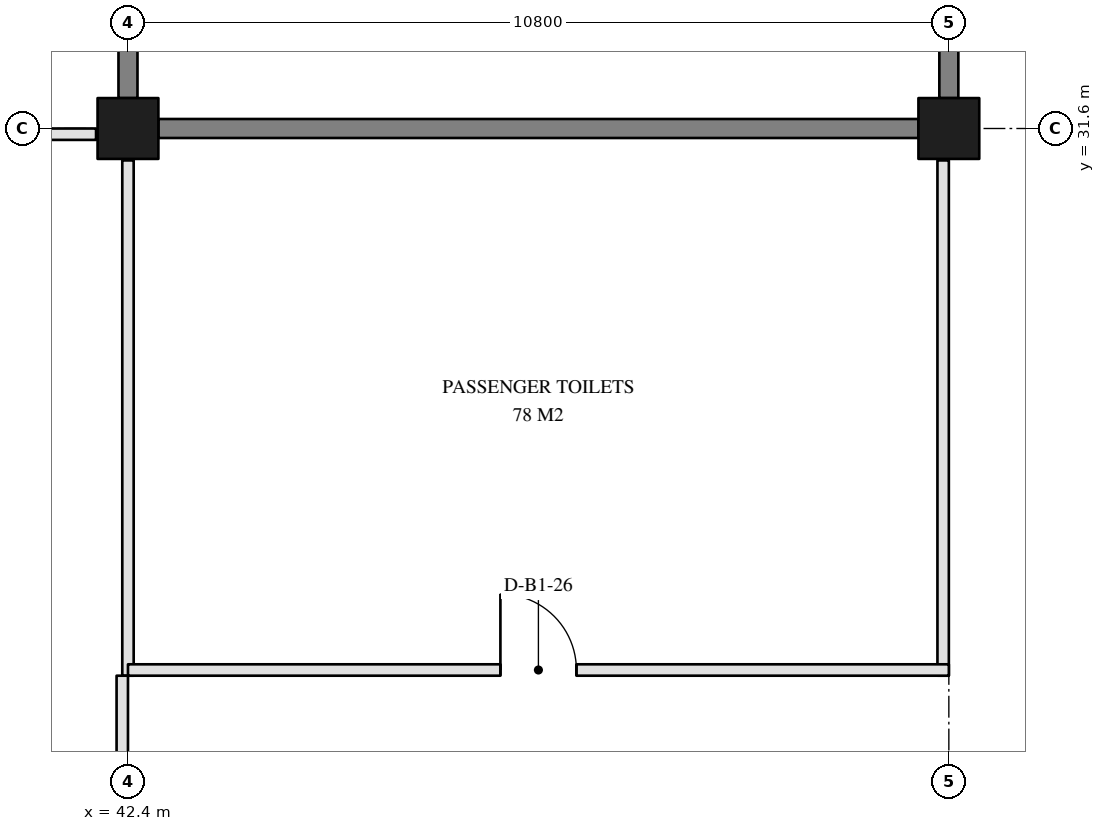
"""IFC4 building model, lengths in metres.
Left out: names, types, materials, properties, quantities, classifications, styles, units other than length and angle.
Written with IfcOpenShell. Run it as: python <this file> out.ifc"""

import sys

from ifc_helpers import new_model, si_unit, direction, frame, frame_2d, origin, origin_2d, place, context, subcontext, project, spatial, rectangle, extrude, element, fill, save


model = new_model("IFC4")
c1 = context("Model", 3, precision=1e-05, world=origin(), true_north=direction((0.0, 1.0)))
c2 = subcontext(c1, "Body", "Model", "MODEL_VIEW")
j1 = project(units=[si_unit("LENGTHUNIT", "METRE"), si_unit("PLANEANGLEUNIT", "RADIAN")], contexts=[c1])
p1 = place(None, origin())
s1 = spatial("IfcSite", under=j1, at=p1, CompositionType="ELEMENT")
p2 = place(p1, origin())
s2 = spatial("IfcBuilding", under=s1, at=p2, CompositionType="ELEMENT")
p3 = place(p2, frame((0.0, 0.0, -5.4)))
s3 = spatial("IfcBuildingStorey", under=s2, at=p3, CompositionType="ELEMENT", Elevation=-5.4)
for number, where, z_axis, x_axis in (
    (1, (42.4, 31.6, -0.4), (0.0, 0.0, 1.0), (1.0, 0.0, 0.0)),
    (2, (53.2, 31.6, -0.4), (0.0, 0.0, 1.0), (1.0, 0.0, 0.0)),
):
    element("IfcColumn", number, at=place(p3, frame(where, z_axis=z_axis, x_axis=x_axis)), inside=s3, PredefinedType="COLUMN", context=c2, shape_type="SweptSolid", body=[
        extrude(rectangle(XDim=0.8, YDim=0.8, at=origin_2d()), origin(), (0.0, 0.0, 1.0), 5.8),
    ])
p4 = place(p3, frame((42.8, 31.6, 0.0), z_axis=(0.0, 0.0, 1.0), x_axis=(1.0, 0.0, 0.0)))
e3 = element("IfcWall", 3, at=p4, inside=s3, PredefinedType="SOLIDWALL", context=c2, shape_type="SweptSolid", body=[
    extrude(rectangle(XDim=10.0, YDim=0.25, at=frame_2d((5.0, 0.0))), origin(), (0.0, 0.0, 1.0), 5.4),
])
p5 = place(p3, frame((53.2, 32.0, 0.0), z_axis=(0.0, 0.0, 1.0), x_axis=(0.0, 1.0, 0.0)))
e4 = element("IfcWall", 4, at=p5, inside=s3, PredefinedType="SOLIDWALL", context=c2, shape_type="SweptSolid", body=[
    extrude(rectangle(XDim=9.9, YDim=0.25, at=frame_2d((4.95, 0.0))), origin(), (0.0, 0.0, 1.0), 5.4),
])
p6 = place(p5, frame((1.613, 0.0, 0.0)))
e5 = element("IfcOpeningElement", 5, at=p6, cuts=e4, PredefinedType="OPENING", context=c2, shape_type="SweptSolid", body=[
    extrude(rectangle(XDim=1.8, YDim=2.1, at=frame_2d((0.9, 1.05))), frame((0.0, 0.135, 0.0), z_axis=(0.0, -1.0, 0.0), x_axis=(1.0, 0.0, 0.0)), (0.0, 0.0, 1.0), 0.27),
])
p7 = place(p3, frame((42.4, 41.9, 0.0), z_axis=(0.0, 0.0, 1.0), x_axis=(0.0, -1.0, 0.0)))
e6 = element("IfcWall", 6, at=p7, inside=s3, PredefinedType="SOLIDWALL", context=c2, shape_type="SweptSolid", body=[
    extrude(rectangle(XDim=9.9, YDim=0.25, at=frame_2d((4.95, 0.0))), origin(), (0.0, 0.0, 1.0), 5.4),
])
p8 = place(p7, frame((6.638, 0.0, 0.0)))
e7 = element("IfcOpeningElement", 7, at=p8, cuts=e6, PredefinedType="OPENING", context=c2, shape_type="SweptSolid", body=[
    extrude(rectangle(XDim=1.8, YDim=2.1, at=frame_2d((0.9, 1.05))), frame((0.0, 0.135, 0.0), z_axis=(0.0, -1.0, 0.0), x_axis=(1.0, 0.0, 0.0)), (0.0, 0.0, 1.0), 0.27),
])
p9 = place(p3, frame((53.125, 24.4, 0.0), z_axis=(0.0, 0.0, 1.0), x_axis=(0.0, 1.0, 0.0)))
e8 = element("IfcWall", 8, at=p9, inside=s3, PredefinedType="PARTITIONING", context=c2, shape_type="SweptSolid", body=[
    extrude(rectangle(XDim=6.78, YDim=0.15, at=frame_2d((3.39, 0.0))), origin(), (0.0, 0.0, 1.0), 3.8),
])
p10 = place(p3, frame((42.4, 24.4, 0.0), z_axis=(0.0, 0.0, 1.0), x_axis=(0.0, 1.0, 0.0)))
e9 = element("IfcWall", 9, at=p10, inside=s3, PredefinedType="PARTITIONING", context=c2, shape_type="SweptSolid", body=[
    extrude(rectangle(XDim=6.78, YDim=0.15, at=frame_2d((3.39, 0.0))), origin(), (0.0, 0.0, 1.0), 3.9),
])
p11 = place(p3, frame((42.4, 24.475, 0.0), z_axis=(0.0, 0.0, 1.0), x_axis=(1.0, 0.0, 0.0)))
e10 = element("IfcWall", 10, at=p11, inside=s3, PredefinedType="PARTITIONING", context=c2, shape_type="SweptSolid", body=[
    extrude(rectangle(XDim=10.8, YDim=0.15, at=frame_2d((5.4, 0.0))), origin(), (0.0, 0.0, 1.0), 3.8),
])
p12 = place(p11, frame((4.9, 0.0, 0.0)))
e11 = element("IfcOpeningElement", 11, at=p12, cuts=e10, PredefinedType="OPENING", context=c2, shape_type="SweptSolid", body=[
    extrude(rectangle(XDim=1.0, YDim=2.1, at=frame_2d((0.5, 1.05))), frame((0.0, 0.085, 0.0), z_axis=(0.0, -1.0, 0.0), x_axis=(1.0, 0.0, 0.0)), (0.0, 0.0, 1.0), 0.17),
])
p13 = place(p3, frame((42.325, 21.22, 0.0), z_axis=(0.0, 0.0, 1.0), x_axis=(0.0, 1.0, 0.0)))
e12 = element("IfcWall", 12, at=p13, inside=s3, PredefinedType="PARTITIONING", context=c2, shape_type="SweptSolid", body=[
    extrude(rectangle(XDim=3.18, YDim=0.15, at=frame_2d((1.59, 0.0))), origin(), (0.0, 0.0, 1.0), 3.9),
])
p14 = place(p3, frame((31.92, 31.525, 0.0), z_axis=(0.0, 0.0, 1.0), x_axis=(1.0, 0.0, 0.0)))
e13 = element("IfcWall", 13, at=p14, inside=s3, PredefinedType="PARTITIONING", context=c2, shape_type="SweptSolid", body=[
    extrude(rectangle(XDim=10.06, YDim=0.15, at=frame_2d((5.03, 0.0))), origin(), (0.0, 0.0, 1.0), 3.6),
])
p15 = place(p14, frame((4.13, 0.0, 0.0)))
e14 = element("IfcOpeningElement", 14, at=p15, cuts=e13, PredefinedType="OPENING", context=c2, shape_type="SweptSolid", body=[
    extrude(rectangle(XDim=1.8, YDim=2.1, at=frame_2d((0.9, 1.05))), frame((0.0, 0.085, 0.0), z_axis=(0.0, -1.0, 0.0), x_axis=(1.0, 0.0, 0.0)), (0.0, 0.0, 1.0), 0.17),
])
p16 = place(p12, origin())
e15 = element("IfcDoor", 15, at=p16, inside=s3, OperationType="SINGLE_SWING_LEFT", PredefinedType="DOOR", context=c2, shape_type="SweptSolid", body=[
    extrude(rectangle(XDim=1.0, YDim=2.1, at=frame_2d((0.5, 1.05))), frame((0.0, 0.025, 0.0), z_axis=(0.0, -1.0, 0.0), x_axis=(1.0, 0.0, 0.0)), (0.0, 0.0, 1.0), 0.05),
])
fill(e11, e15)
save(model, sys.argv[1])
